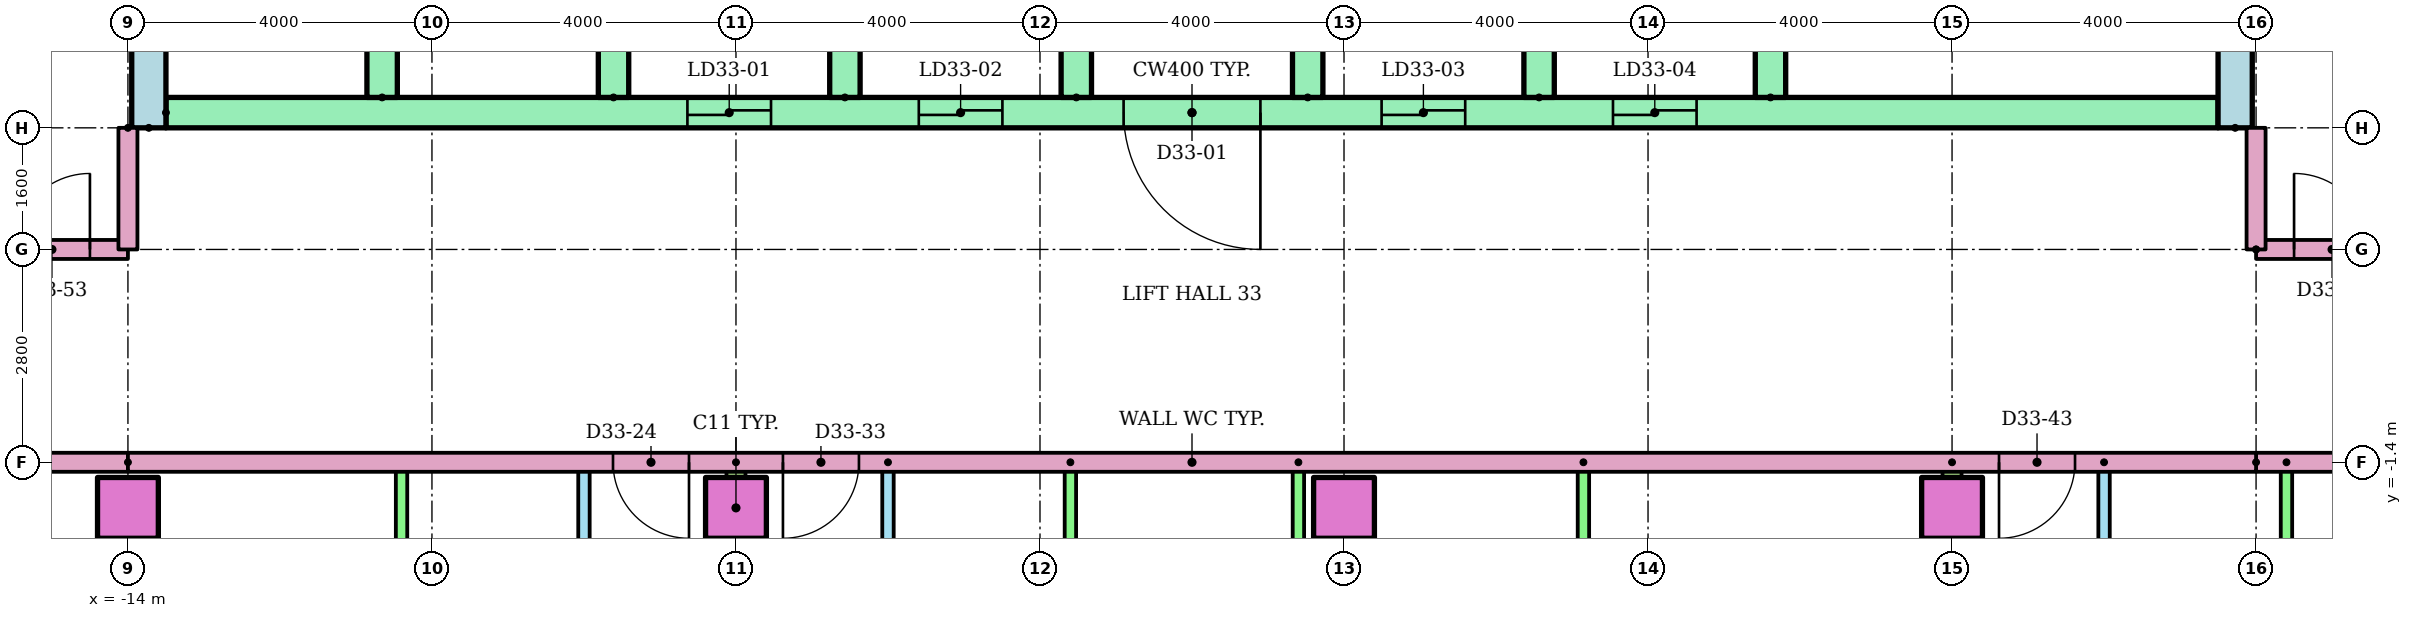
"""IFC4 building model, lengths in metres.
Left out: names, types, materials, properties, quantities, classifications, styles, units other than length and angle.
Written with IfcOpenShell. Run it as: python <this file> out.ifc"""

import sys

from ifc_helpers import new_model, si_unit, direction, frame, frame_2d, origin, origin_2d, place, context, subcontext, project, spatial, rectangle, extrude, element, fill, save


model = new_model("IFC4")
c1 = context("Model", 3, precision=1e-05, world=origin(), true_north=direction((0.0, 1.0)))
c2 = subcontext(c1, "Body", "Model", "MODEL_VIEW")
j1 = project(units=[si_unit("LENGTHUNIT", "METRE"), si_unit("PLANEANGLEUNIT", "RADIAN")], contexts=[c1])
p1 = place(None, origin())
s1 = spatial("IfcSite", under=j1, at=p1, CompositionType="ELEMENT")
p2 = place(p1, origin())
s2 = spatial("IfcBuilding", under=s1, at=p2, CompositionType="ELEMENT")
p3 = place(p2, frame((0.0, 0.0, 129.4)))
s3 = spatial("IfcBuildingStorey", under=s2, at=p3, CompositionType="ELEMENT", Elevation=129.4)
for number, where in (
    (1, (-14.0, -2.0, 0.0)),
    (2, (-6.0, -2.0, 0.0)),
    (3, (2.0, -2.0, 0.0)),
    (4, (10.0, -2.0, 0.0)),
):
    element("IfcColumn", number, at=place(p3, frame(where)), inside=s3, PredefinedType="COLUMN", context=c2, shape_type="SweptSolid", body=[
        extrude(rectangle(XDim=0.8, YDim=0.8, at=origin_2d()), origin(), (0.0, 0.0, 1.0), 3.2),
    ])
for number, where, z_axis, x_axis in (
    (5, (-13.725, 3.0, 0.0), (0.0, 0.0, 1.0), (0.0, 1.0, 0.0)),
    (6, (13.725, 3.0, 0.0), (0.0, 0.0, 1.0), (0.0, 1.0, 0.0)),
):
    element("IfcWall", number, at=place(p3, frame(where, z_axis=z_axis, x_axis=x_axis)), inside=s3, PredefinedType="SHEAR", context=c2, shape_type="SweptSolid", body=[
        extrude(rectangle(XDim=17.0, YDim=0.45, at=frame_2d((8.5, 0.0))), origin(), (0.0, 0.0, 1.0), 2.92),
    ])
p4 = place(p3, frame((-13.5, 3.2, 0.0)))
e7 = element("IfcWall", 7, at=p4, inside=s3, PredefinedType="SHEAR", context=c2, shape_type="SweptSolid", body=[
    extrude(rectangle(XDim=27.0, YDim=0.4, at=frame_2d((13.5, 0.0))), origin(), (0.0, 0.0, 1.0), 2.92),
])
p5 = place(p4, frame((6.861, 0.0, 0.0)))
e8 = element("IfcOpeningElement", 8, at=p5, cuts=e7, PredefinedType="OPENING", context=c2, shape_type="SweptSolid", body=[
    extrude(rectangle(XDim=1.1, YDim=2.1, at=frame_2d((0.55, 1.05))), frame((0.0, 0.21, 0.0), z_axis=(0.0, -1.0, 0.0), x_axis=(1.0, 0.0, 0.0)), (0.0, 0.0, 1.0), 0.42),
])
p6 = place(p4, frame((9.906, 0.0, 0.0)))
e9 = element("IfcOpeningElement", 9, at=p6, cuts=e7, PredefinedType="OPENING", context=c2, shape_type="SweptSolid", body=[
    extrude(rectangle(XDim=1.1, YDim=2.1, at=frame_2d((0.55, 1.05))), frame((0.0, 0.21, 0.0), z_axis=(0.0, -1.0, 0.0), x_axis=(1.0, 0.0, 0.0)), (0.0, 0.0, 1.0), 0.42),
])
p7 = place(p4, frame((15.994, 0.0, 0.0)))
e10 = element("IfcOpeningElement", 10, at=p7, cuts=e7, PredefinedType="OPENING", context=c2, shape_type="SweptSolid", body=[
    extrude(rectangle(XDim=1.1, YDim=2.1, at=frame_2d((0.55, 1.05))), frame((0.0, 0.21, 0.0), z_axis=(0.0, -1.0, 0.0), x_axis=(1.0, 0.0, 0.0)), (0.0, 0.0, 1.0), 0.42),
])
p8 = place(p4, frame((19.039, 0.0, 0.0)))
e11 = element("IfcOpeningElement", 11, at=p8, cuts=e7, PredefinedType="OPENING", context=c2, shape_type="SweptSolid", body=[
    extrude(rectangle(XDim=1.1, YDim=2.1, at=frame_2d((0.55, 1.05))), frame((0.0, 0.21, 0.0), z_axis=(0.0, -1.0, 0.0), x_axis=(1.0, 0.0, 0.0)), (0.0, 0.0, 1.0), 0.42),
])
p9 = place(p4, frame((12.6, 0.0, 0.0)))
e12 = element("IfcOpeningElement", 12, at=p9, cuts=e7, PredefinedType="OPENING", context=c2, shape_type="SweptSolid", body=[
    extrude(rectangle(XDim=1.8, YDim=2.1, at=frame_2d((0.9, 1.05))), frame((0.0, 0.21, 0.0), z_axis=(0.0, -1.0, 0.0), x_axis=(1.0, 0.0, 0.0)), (0.0, 0.0, 1.0), 0.42),
])
for number, where, z_axis, x_axis in (
    (13, (-10.656, 3.4, 0.0), (0.0, 0.0, 1.0), (0.0, 1.0, 0.0)),
    (14, (-7.611, 3.4, 0.0), (0.0, 0.0, 1.0), (0.0, 1.0, 0.0)),
    (15, (-4.567, 3.4, 0.0), (0.0, 0.0, 1.0), (0.0, 1.0, 0.0)),
    (16, (-1.522, 3.4, 0.0), (0.0, 0.0, 1.0), (0.0, 1.0, 0.0)),
    (17, (1.522, 3.4, 0.0), (0.0, 0.0, 1.0), (0.0, 1.0, 0.0)),
    (18, (4.567, 3.4, 0.0), (0.0, 0.0, 1.0), (0.0, 1.0, 0.0)),
    (19, (7.611, 3.4, 0.0), (0.0, 0.0, 1.0), (0.0, 1.0, 0.0)),
):
    element("IfcWall", number, at=place(p3, frame(where, z_axis=z_axis, x_axis=x_axis)), inside=s3, PredefinedType="SHEAR", context=c2, shape_type="SweptSolid", body=[
        extrude(rectangle(XDim=3.0, YDim=0.4, at=frame_2d((1.5, 0.0))), origin(), (0.0, 0.0, 1.0), 2.92),
    ])
p10 = place(p3, frame((-8.0, -9.2, 0.0), z_axis=(0.0, 0.0, 1.0), x_axis=(0.0, 1.0, 0.0)))
e20 = element("IfcWall", 20, at=p10, inside=s3, PredefinedType="PARTITIONING", context=c2, shape_type="SweptSolid", body=[
    extrude(rectangle(XDim=7.8, YDim=0.15, at=frame_2d((3.9, 0.0))), origin(), (0.0, 0.0, 1.0), 2.4),
])
p11 = place(p10, frame((5.225, 0.0, 0.0)))
e21 = element("IfcOpeningElement", 21, at=p11, cuts=e20, PredefinedType="OPENING", context=c2, shape_type="SweptSolid", body=[
    extrude(rectangle(XDim=0.9, YDim=2.1, at=frame_2d((0.45, 1.05))), frame((0.0, 0.085, 0.0), z_axis=(0.0, -1.0, 0.0), x_axis=(1.0, 0.0, 0.0)), (0.0, 0.0, 1.0), 0.17),
])
p12 = place(p10, frame((1.375, 0.0, 0.0)))
e22 = element("IfcOpeningElement", 22, at=p12, cuts=e20, PredefinedType="OPENING", context=c2, shape_type="SweptSolid", body=[
    extrude(rectangle(XDim=0.8, YDim=2.1, at=frame_2d((0.4, 1.05))), frame((0.0, 0.085, 0.0), z_axis=(0.0, -1.0, 0.0), x_axis=(1.0, 0.0, 0.0)), (0.0, 0.0, 1.0), 0.17),
])
p13 = place(p3, frame((-10.4, -9.2, 0.0), z_axis=(0.0, 0.0, 1.0), x_axis=(0.0, 1.0, 0.0)))
e23 = element("IfcWall", 23, at=p13, inside=s3, PredefinedType="PARTITIONING", context=c2, shape_type="SweptSolid", body=[
    extrude(rectangle(XDim=7.8, YDim=0.15, at=frame_2d((3.9, 0.0))), origin(), (0.0, 0.0, 1.0), 2.4),
])
p14 = place(p3, frame((-4.0, -1.4, 0.0), z_axis=(0.0, 0.0, 1.0), x_axis=(0.0, -1.0, 0.0)))
e24 = element("IfcWall", 24, at=p14, inside=s3, PredefinedType="PARTITIONING", context=c2, shape_type="SweptSolid", body=[
    extrude(rectangle(XDim=7.8, YDim=0.15, at=frame_2d((3.9, 0.0))), origin(), (0.0, 0.0, 1.0), 2.4),
])
p15 = place(p14, frame((1.675, 0.0, 0.0)))
e25 = element("IfcOpeningElement", 25, at=p15, cuts=e24, PredefinedType="OPENING", context=c2, shape_type="SweptSolid", body=[
    extrude(rectangle(XDim=0.9, YDim=2.1, at=frame_2d((0.45, 1.05))), frame((0.0, 0.085, 0.0), z_axis=(0.0, -1.0, 0.0), x_axis=(1.0, 0.0, 0.0)), (0.0, 0.0, 1.0), 0.17),
])
p16 = place(p14, frame((5.625, 0.0, 0.0)))
e26 = element("IfcOpeningElement", 26, at=p16, cuts=e24, PredefinedType="OPENING", context=c2, shape_type="SweptSolid", body=[
    extrude(rectangle(XDim=0.8, YDim=2.1, at=frame_2d((0.4, 1.05))), frame((0.0, 0.085, 0.0), z_axis=(0.0, -1.0, 0.0), x_axis=(1.0, 0.0, 0.0)), (0.0, 0.0, 1.0), 0.17),
])
for number, where, z_axis, x_axis in (
    (27, (-1.6, -1.4, 0.0), (0.0, 0.0, 1.0), (0.0, -1.0, 0.0)),
    (28, (1.4, -1.4, 0.0), (0.0, 0.0, 1.0), (0.0, -1.0, 0.0)),
    (29, (5.15, -1.4, 0.0), (0.0, 0.0, 1.0), (0.0, -1.0, 0.0)),
):
    element("IfcWall", number, at=place(p3, frame(where, z_axis=z_axis, x_axis=x_axis)), inside=s3, PredefinedType="PARTITIONING", context=c2, shape_type="SweptSolid", body=[
        extrude(rectangle(XDim=7.8, YDim=0.15, at=frame_2d((3.9, 0.0))), origin(), (0.0, 0.0, 1.0), 2.4),
    ])
p17 = place(p3, frame((-6.0, -1.4, 0.0), z_axis=(0.0, 0.0, 1.0), x_axis=(0.0, -1.0, 0.0)))
e30 = element("IfcWall", 30, at=p17, inside=s3, PredefinedType="PARTITIONING", context=c2, shape_type="SweptSolid", body=[
    extrude(rectangle(XDim=14.91, YDim=0.25, at=frame_2d((7.455, 0.0))), origin(), (0.0, 0.0, 1.0), 2.4),
])
p18 = place(p3, frame((12.0, -1.4, 0.0), z_axis=(0.0, 0.0, 1.0), x_axis=(0.0, -1.0, 0.0)))
e31 = element("IfcWall", 31, at=p18, inside=s3, PredefinedType="PARTITIONING", context=c2, shape_type="SweptSolid", body=[
    extrude(rectangle(XDim=7.8, YDim=0.15, at=frame_2d((3.9, 0.0))), origin(), (0.0, 0.0, 1.0), 2.4),
])
p19 = place(p18, frame((1.675, 0.0, 0.0)))
e32 = element("IfcOpeningElement", 32, at=p19, cuts=e31, PredefinedType="OPENING", context=c2, shape_type="SweptSolid", body=[
    extrude(rectangle(XDim=0.9, YDim=2.1, at=frame_2d((0.45, 1.05))), frame((0.0, 0.085, 0.0), z_axis=(0.0, -1.0, 0.0), x_axis=(1.0, 0.0, 0.0)), (0.0, 0.0, 1.0), 0.17),
])
p20 = place(p18, frame((5.625, 0.0, 0.0)))
e33 = element("IfcOpeningElement", 33, at=p20, cuts=e31, PredefinedType="OPENING", context=c2, shape_type="SweptSolid", body=[
    extrude(rectangle(XDim=0.8, YDim=2.1, at=frame_2d((0.4, 1.05))), frame((0.0, 0.085, 0.0), z_axis=(0.0, -1.0, 0.0), x_axis=(1.0, 0.0, 0.0)), (0.0, 0.0, 1.0), 0.17),
])
p21 = place(p3, frame((14.4, -1.4, 0.0), z_axis=(0.0, 0.0, 1.0), x_axis=(0.0, -1.0, 0.0)))
e34 = element("IfcWall", 34, at=p21, inside=s3, PredefinedType="PARTITIONING", context=c2, shape_type="SweptSolid", body=[
    extrude(rectangle(XDim=7.8, YDim=0.15, at=frame_2d((3.9, 0.0))), origin(), (0.0, 0.0, 1.0), 2.4),
])
p22 = place(p3, frame((10.0, -1.4, 0.0), z_axis=(0.0, 0.0, 1.0), x_axis=(0.0, -1.0, 0.0)))
e35 = element("IfcWall", 35, at=p22, inside=s3, PredefinedType="PARTITIONING", context=c2, shape_type="SweptSolid", body=[
    extrude(rectangle(XDim=14.91, YDim=0.25, at=frame_2d((7.455, 0.0))), origin(), (0.0, 0.0, 1.0), 2.4),
])
for number, where, z_axis, x_axis in (
    (36, (-14.0, -1.4, 0.0), (0.0, 0.0, 1.0), (-1.0, 0.0, 0.0)),
    (37, (29.0, -1.4, 0.0), (0.0, 0.0, 1.0), (-1.0, 0.0, 0.0)),
):
    element("IfcWall", number, at=place(p3, frame(where, z_axis=z_axis, x_axis=x_axis)), inside=s3, PredefinedType="PARTITIONING", context=c2, shape_type="SweptSolid", body=[
        extrude(rectangle(XDim=15.0, YDim=0.25, at=frame_2d((7.5, 0.0))), origin(), (0.0, 0.0, 1.0), 2.4),
    ])
p23 = place(p3, frame((-29.0, 1.4, 0.0)))
e38 = element("IfcWall", 38, at=p23, inside=s3, PredefinedType="PARTITIONING", context=c2, shape_type="SweptSolid", body=[
    extrude(rectangle(XDim=15.0, YDim=0.25, at=frame_2d((7.5, 0.0))), origin(), (0.0, 0.0, 1.0), 2.4),
])
p24 = place(p23, frame((13.5, 0.0, 0.0)))
e39 = element("IfcOpeningElement", 39, at=p24, cuts=e38, PredefinedType="OPENING", context=c2, shape_type="SweptSolid", body=[
    extrude(rectangle(XDim=1.0, YDim=2.1, at=frame_2d((0.5, 1.05))), frame((0.0, 0.135, 0.0), z_axis=(0.0, -1.0, 0.0), x_axis=(1.0, 0.0, 0.0)), (0.0, 0.0, 1.0), 0.27),
])
p25 = place(p3, frame((14.0, 1.4, 0.0)))
e40 = element("IfcWall", 40, at=p25, inside=s3, PredefinedType="PARTITIONING", context=c2, shape_type="SweptSolid", body=[
    extrude(rectangle(XDim=15.0, YDim=0.25, at=frame_2d((7.5, 0.0))), origin(), (0.0, 0.0, 1.0), 2.4),
])
p26 = place(p25, frame((0.5, 0.0, 0.0)))
e41 = element("IfcOpeningElement", 41, at=p26, cuts=e40, PredefinedType="OPENING", context=c2, shape_type="SweptSolid", body=[
    extrude(rectangle(XDim=1.0, YDim=2.1, at=frame_2d((0.5, 1.05))), frame((0.0, 0.135, 0.0), z_axis=(0.0, -1.0, 0.0), x_axis=(1.0, 0.0, 0.0)), (0.0, 0.0, 1.0), 0.27),
])
p27 = place(p3, frame((14.0, -1.4, 0.0), z_axis=(0.0, 0.0, 1.0), x_axis=(-1.0, 0.0, 0.0)))
e42 = element("IfcWall", 42, at=p27, inside=s3, PredefinedType="PARTITIONING", context=c2, shape_type="SweptSolid", body=[
    extrude(rectangle(XDim=28.0, YDim=0.25, at=frame_2d((14.0, 0.0))), origin(), (0.0, 0.0, 1.0), 2.4),
])
p28 = place(p27, frame((20.618, 0.0, 0.0)))
e43 = element("IfcOpeningElement", 43, at=p28, cuts=e42, PredefinedType="OPENING", context=c2, shape_type="SweptSolid", body=[
    extrude(rectangle(XDim=1.0, YDim=2.1, at=frame_2d((0.5, 1.05))), frame((0.0, 0.135, 0.0), z_axis=(0.0, -1.0, 0.0), x_axis=(1.0, 0.0, 0.0)), (0.0, 0.0, 1.0), 0.27),
])
p29 = place(p27, frame((18.382, 0.0, 0.0)))
e44 = element("IfcOpeningElement", 44, at=p29, cuts=e42, PredefinedType="OPENING", context=c2, shape_type="SweptSolid", body=[
    extrude(rectangle(XDim=1.0, YDim=2.1, at=frame_2d((0.5, 1.05))), frame((0.0, 0.135, 0.0), z_axis=(0.0, -1.0, 0.0), x_axis=(1.0, 0.0, 0.0)), (0.0, 0.0, 1.0), 0.27),
])
p30 = place(p27, frame((2.382, 0.0, 0.0)))
e45 = element("IfcOpeningElement", 45, at=p30, cuts=e42, PredefinedType="OPENING", context=c2, shape_type="SweptSolid", body=[
    extrude(rectangle(XDim=1.0, YDim=2.1, at=frame_2d((0.5, 1.05))), frame((0.0, 0.135, 0.0), z_axis=(0.0, -1.0, 0.0), x_axis=(1.0, 0.0, 0.0)), (0.0, 0.0, 1.0), 0.27),
])
for number, where, z_axis, x_axis in (
    (46, (-14.0, 3.0, 0.0), (0.0, 0.0, 1.0), (0.0, -1.0, 0.0)),
    (47, (14.0, 1.4, 0.0), (0.0, 0.0, 1.0), (0.0, 1.0, 0.0)),
):
    element("IfcWall", number, at=place(p3, frame(where, z_axis=z_axis, x_axis=x_axis)), inside=s3, PredefinedType="PARTITIONING", context=c2, shape_type="SweptSolid", body=[
        extrude(rectangle(XDim=1.6, YDim=0.25, at=frame_2d((0.8, 0.0))), origin(), (0.0, 0.0, 1.0), 2.4),
    ])
p31 = place(p5, origin())
e48 = element("IfcDoor", 48, at=p31, inside=s3, OperationType="SLIDING_TO_LEFT", PredefinedType="DOOR", context=c2, shape_type="SweptSolid", body=[
    extrude(rectangle(XDim=1.1, YDim=2.1, at=frame_2d((0.55, 1.05))), frame((0.0, 0.025, 0.0), z_axis=(0.0, -1.0, 0.0), x_axis=(1.0, 0.0, 0.0)), (0.0, 0.0, 1.0), 0.05),
])
fill(e8, e48)
p32 = place(p6, origin())
e49 = element("IfcDoor", 49, at=p32, inside=s3, OperationType="SLIDING_TO_LEFT", PredefinedType="DOOR", context=c2, shape_type="SweptSolid", body=[
    extrude(rectangle(XDim=1.1, YDim=2.1, at=frame_2d((0.55, 1.05))), frame((0.0, 0.025, 0.0), z_axis=(0.0, -1.0, 0.0), x_axis=(1.0, 0.0, 0.0)), (0.0, 0.0, 1.0), 0.05),
])
fill(e9, e49)
p33 = place(p7, origin())
e50 = element("IfcDoor", 50, at=p33, inside=s3, OperationType="SLIDING_TO_LEFT", PredefinedType="DOOR", context=c2, shape_type="SweptSolid", body=[
    extrude(rectangle(XDim=1.1, YDim=2.1, at=frame_2d((0.55, 1.05))), frame((0.0, 0.025, 0.0), z_axis=(0.0, -1.0, 0.0), x_axis=(1.0, 0.0, 0.0)), (0.0, 0.0, 1.0), 0.05),
])
fill(e10, e50)
p34 = place(p8, origin())
e51 = element("IfcDoor", 51, at=p34, inside=s3, OperationType="SLIDING_TO_LEFT", PredefinedType="DOOR", context=c2, shape_type="SweptSolid", body=[
    extrude(rectangle(XDim=1.1, YDim=2.1, at=frame_2d((0.55, 1.05))), frame((0.0, 0.025, 0.0), z_axis=(0.0, -1.0, 0.0), x_axis=(1.0, 0.0, 0.0)), (0.0, 0.0, 1.0), 0.05),
])
fill(e11, e51)
p35 = place(p9, frame((1.8, 0.0, 0.0), z_axis=(0.0, 0.0, 1.0), x_axis=(-1.0, 0.0, 0.0)))
e52 = element("IfcDoor", 52, at=p35, inside=s3, OperationType="DOUBLE_DOOR_SINGLE_SWING", PredefinedType="DOOR", context=c2, shape_type="SweptSolid", body=[
    extrude(rectangle(XDim=1.8, YDim=2.1, at=frame_2d((0.9, 1.05))), frame((0.0, 0.025, 0.0), z_axis=(0.0, -1.0, 0.0), x_axis=(1.0, 0.0, 0.0)), (0.0, 0.0, 1.0), 0.05),
])
fill(e12, e52)
p36 = place(p28, origin())
e53 = element("IfcDoor", 53, at=p36, inside=s3, OperationType="SINGLE_SWING_LEFT", PredefinedType="DOOR", context=c2, shape_type="SweptSolid", body=[
    extrude(rectangle(XDim=1.0, YDim=2.1, at=frame_2d((0.5, 1.05))), frame((0.0, 0.025, 0.0), z_axis=(0.0, -1.0, 0.0), x_axis=(1.0, 0.0, 0.0)), (0.0, 0.0, 1.0), 0.05),
])
fill(e43, e53)
p37 = place(p29, origin())
e54 = element("IfcDoor", 54, at=p37, inside=s3, OperationType="SINGLE_SWING_RIGHT", PredefinedType="DOOR", context=c2, shape_type="SweptSolid", body=[
    extrude(rectangle(XDim=1.0, YDim=2.1, at=frame_2d((0.5, 1.05))), frame((0.0, 0.025, 0.0), z_axis=(0.0, -1.0, 0.0), x_axis=(1.0, 0.0, 0.0)), (0.0, 0.0, 1.0), 0.05),
])
fill(e44, e54)
p38 = place(p30, origin())
e55 = element("IfcDoor", 55, at=p38, inside=s3, OperationType="SINGLE_SWING_RIGHT", PredefinedType="DOOR", context=c2, shape_type="SweptSolid", body=[
    extrude(rectangle(XDim=1.0, YDim=2.1, at=frame_2d((0.5, 1.05))), frame((0.0, 0.025, 0.0), z_axis=(0.0, -1.0, 0.0), x_axis=(1.0, 0.0, 0.0)), (0.0, 0.0, 1.0), 0.05),
])
fill(e45, e55)
p39 = place(p24, origin())
e56 = element("IfcDoor", 56, at=p39, inside=s3, OperationType="SINGLE_SWING_RIGHT", PredefinedType="DOOR", context=c2, shape_type="SweptSolid", body=[
    extrude(rectangle(XDim=1.0, YDim=2.1, at=frame_2d((0.5, 1.05))), frame((0.0, 0.025, 0.0), z_axis=(0.0, -1.0, 0.0), x_axis=(1.0, 0.0, 0.0)), (0.0, 0.0, 1.0), 0.05),
])
fill(e39, e56)
p40 = place(p26, origin())
e57 = element("IfcDoor", 57, at=p40, inside=s3, OperationType="SINGLE_SWING_LEFT", PredefinedType="DOOR", context=c2, shape_type="SweptSolid", body=[
    extrude(rectangle(XDim=1.0, YDim=2.1, at=frame_2d((0.5, 1.05))), frame((0.0, 0.025, 0.0), z_axis=(0.0, -1.0, 0.0), x_axis=(1.0, 0.0, 0.0)), (0.0, 0.0, 1.0), 0.05),
])
fill(e41, e57)
save(model, sys.argv[1])
